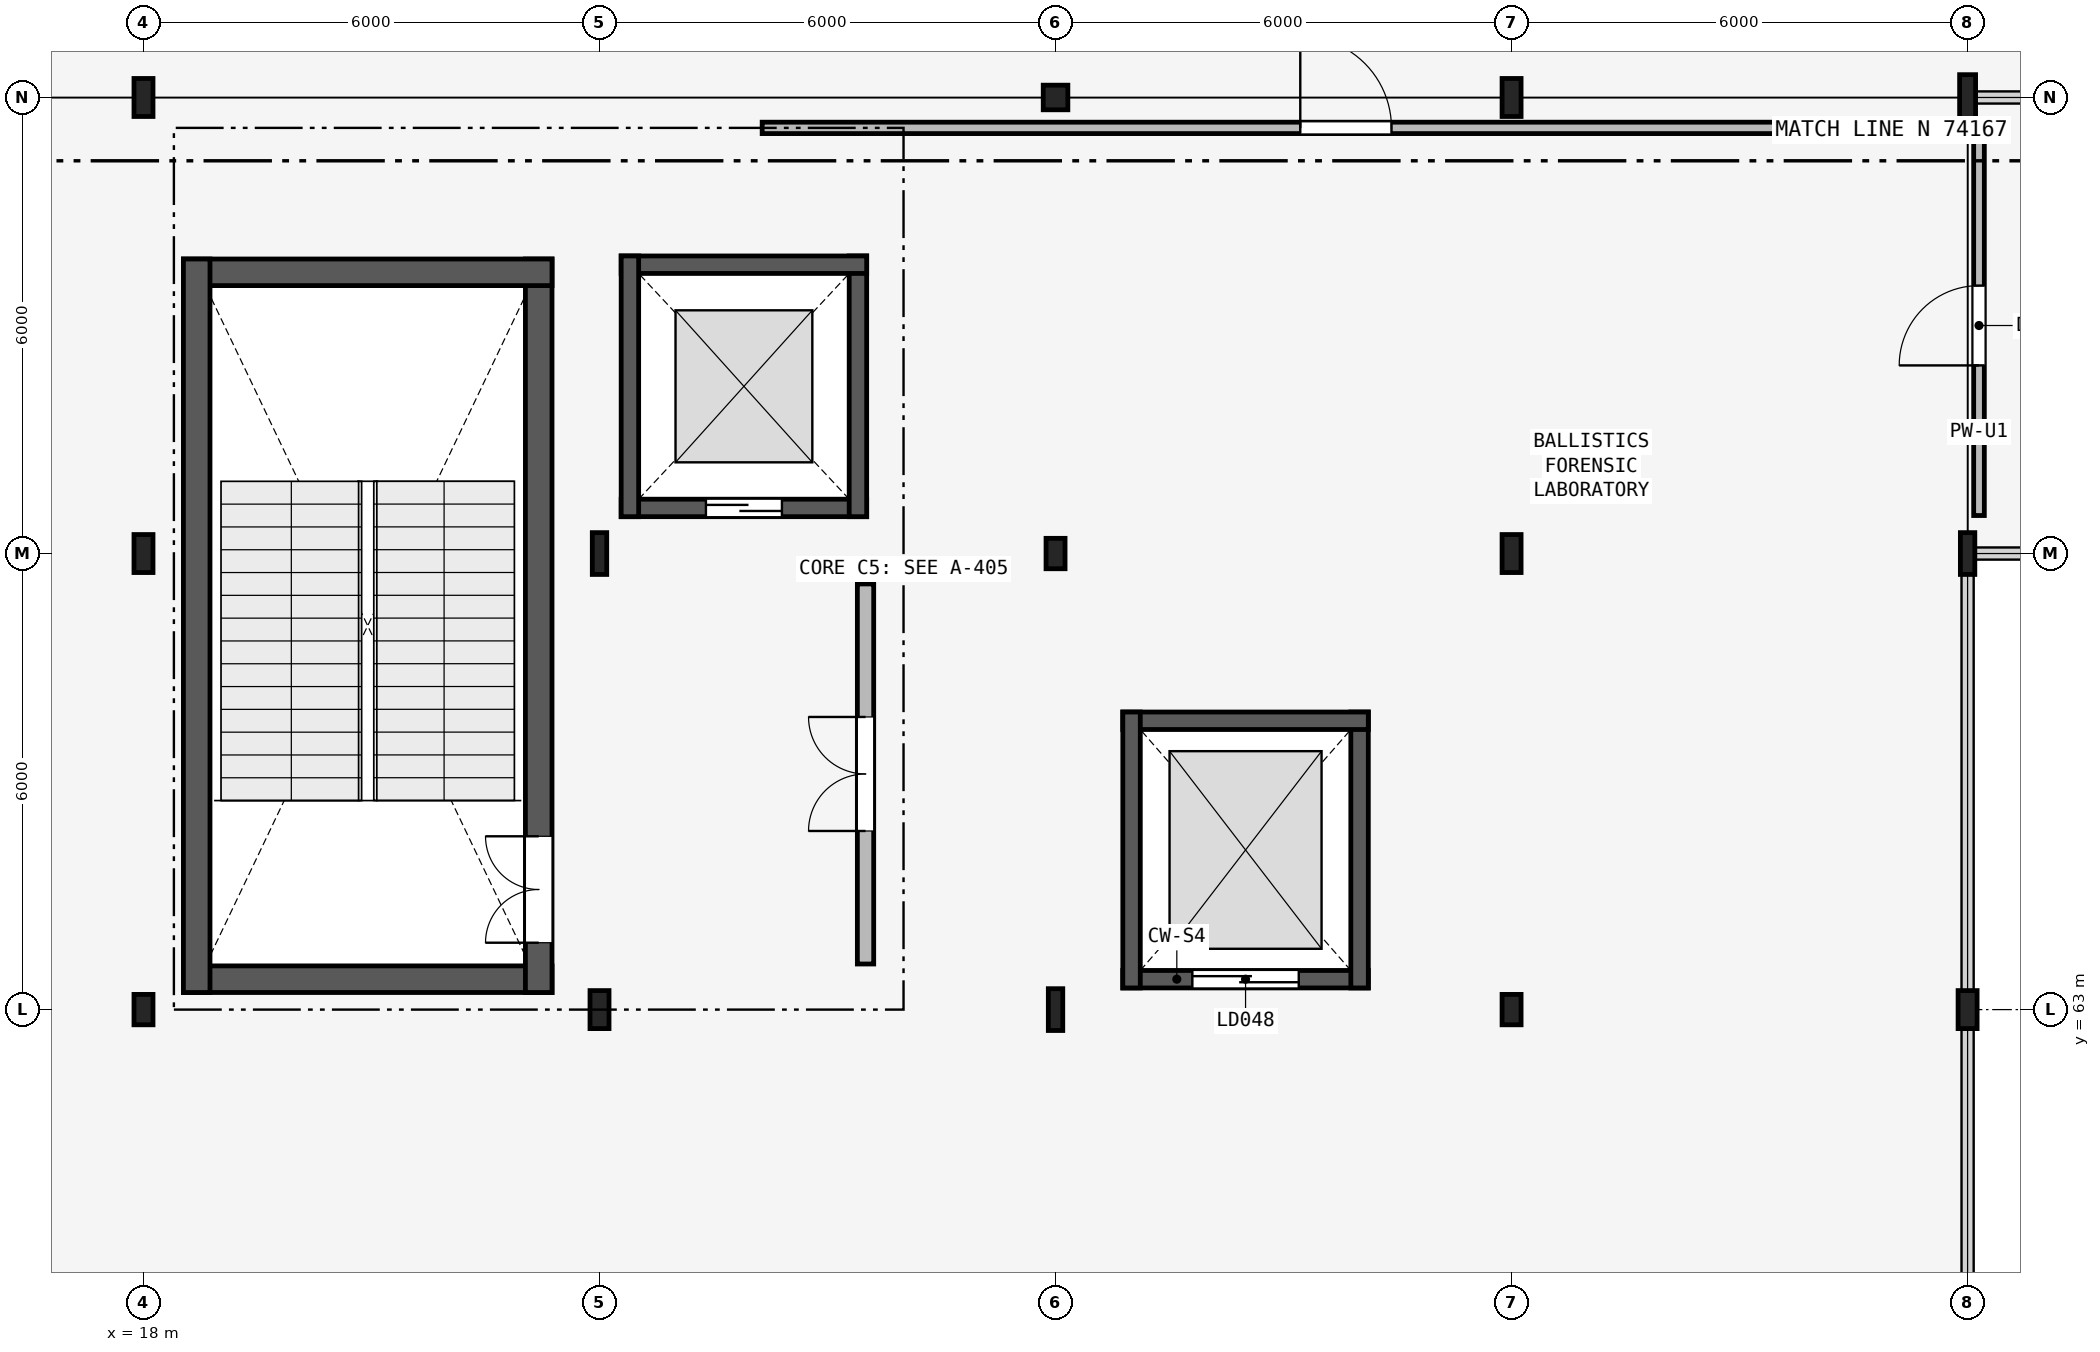
"""IFC4 building model, lengths in metres.
Left out: names, types, materials, properties, quantities, classifications, styles, units other than length and angle.
Written with IfcOpenShell. Run it as: python <this file> out.ifc"""

import sys

from ifc_helpers import new_model, si_unit, direction, frame, frame_2d, origin, origin_2d, place, context, subcontext, project, spatial, rectangle, hollow_circle, i_section, extrude, element, fill, save


model = new_model("IFC4")
c1 = context("Model", 3, precision=1e-05, world=origin(), true_north=direction((0.0, 1.0)))
c2 = subcontext(c1, "Body", "Model", "MODEL_VIEW")
j1 = project(units=[si_unit("LENGTHUNIT", "METRE"), si_unit("PLANEANGLEUNIT", "RADIAN")], contexts=[c1])
p1 = place(None, origin())
s1 = spatial("IfcSite", under=j1, at=p1, CompositionType="ELEMENT")
p2 = place(p1, origin())
s2 = spatial("IfcBuilding", under=s1, at=p2, CompositionType="ELEMENT")
p3 = place(p2, frame((0.0, 0.0, 13.5)))
s3 = spatial("IfcBuildingStorey", under=s2, at=p3, CompositionType="ELEMENT", Elevation=13.5)
p4 = place(p3, frame((18.0, 63.0, 0.0), z_axis=(0.0, 0.0, 1.0), x_axis=(1.0, 0.0, 0.0)))
e1 = element("IfcColumn", 1, at=p4, inside=s3, PredefinedType="COLUMN", context=c2, shape_type="SweptSolid", body=[
    extrude(i_section(OverallWidth=0.25, OverallDepth=0.4, WebThickness=0.01, FlangeThickness=0.013, FilletRadius=0.014, at=origin_2d()), origin(), (0.0, 0.0, 1.0), 4.5),
])
for number, where, z_axis, x_axis in (
    (2, (18.0, 69.0, 0.0), (0.0, 0.0, 1.0), (1.0, 0.0, 0.0)),
    (3, (18.0, 75.0, 0.0), (0.0, 0.0, 1.0), (1.0, 0.0, 0.0)),
    (4, (24.0, 63.0, 0.0), (0.0, 0.0, 1.0), (1.0, 0.0, 0.0)),
):
    element("IfcColumn", number, at=place(p3, frame(where, z_axis=z_axis, x_axis=x_axis)), inside=s3, PredefinedType="COLUMN", context=c2, shape_type="SweptSolid", body=[
        extrude(i_section(OverallWidth=0.25, OverallDepth=0.5, WebThickness=0.01, FlangeThickness=0.015, FilletRadius=0.015, at=origin_2d()), origin(), (0.0, 0.0, 1.0), 4.5),
    ])
for number, where, z_axis, x_axis in (
    (5, (24.0, 69.0, 0.0), (0.0, 0.0, 1.0), (1.0, 0.0, 0.0)),
    (6, (30.0, 63.0, 0.0), (0.0, 0.0, 1.0), (1.0, 0.0, 0.0)),
):
    element("IfcColumn", number, at=place(p3, frame(where, z_axis=z_axis, x_axis=x_axis)), inside=s3, PredefinedType="COLUMN", context=c2, shape_type="SweptSolid", body=[
        extrude(i_section(OverallWidth=0.19, OverallDepth=0.55, WebThickness=0.011, FlangeThickness=0.019, FilletRadius=0.018, at=origin_2d()), origin(), (0.0, 0.0, 1.0), 4.5),
    ])
p5 = place(p3, frame((30.0, 69.0, 0.0), z_axis=(0.0, 0.0, 1.0), x_axis=(1.0, 0.0, 0.0)))
e7 = element("IfcColumn", 7, at=p5, inside=s3, PredefinedType="COLUMN", context=c2, shape_type="SweptSolid", body=[
    extrude(i_section(OverallWidth=0.25, OverallDepth=0.4, WebThickness=0.01, FlangeThickness=0.013, FilletRadius=0.014, at=origin_2d()), origin(), (0.0, 0.0, 1.0), 4.5),
])
p6 = place(p3, frame((30.0, 75.0, 0.0), z_axis=(0.0, 0.0, 1.0), x_axis=(1.0, 0.0, 0.0)))
e8 = element("IfcColumn", 8, at=p6, inside=s3, PredefinedType="COLUMN", context=c2, shape_type="SweptSolid", body=[
    extrude(hollow_circle(Radius=0.162, WallThickness=0.013, at=origin_2d()), origin(), (0.0, 0.0, 1.0), 4.5),
])
p7 = place(p3, frame((36.0, 63.0, 0.0), z_axis=(0.0, 0.0, 1.0), x_axis=(1.0, 0.0, 0.0)))
e9 = element("IfcColumn", 9, at=p7, inside=s3, PredefinedType="COLUMN", context=c2, shape_type="SweptSolid", body=[
    extrude(i_section(OverallWidth=0.25, OverallDepth=0.4, WebThickness=0.01, FlangeThickness=0.013, FilletRadius=0.014, at=origin_2d()), origin(), (0.0, 0.0, 1.0), 4.5),
])
for number, where, z_axis, x_axis in (
    (10, (36.0, 69.0, 0.0), (0.0, 0.0, 1.0), (1.0, 0.0, 0.0)),
    (11, (36.0, 75.0, 0.0), (0.0, 0.0, 1.0), (1.0, 0.0, 0.0)),
    (12, (42.0, 63.0, 0.0), (0.0, 0.0, 1.0), (1.0, 0.0, 0.0)),
):
    element("IfcColumn", number, at=place(p3, frame(where, z_axis=z_axis, x_axis=x_axis)), inside=s3, PredefinedType="COLUMN", context=c2, shape_type="SweptSolid", body=[
        extrude(i_section(OverallWidth=0.25, OverallDepth=0.5, WebThickness=0.01, FlangeThickness=0.015, FilletRadius=0.015, at=origin_2d()), origin(), (0.0, 0.0, 1.0), 4.5),
    ])
p8 = place(p3, frame((42.0, 69.0, 0.0), z_axis=(0.0, 0.0, 1.0), x_axis=(1.0, 0.0, 0.0)))
e13 = element("IfcColumn", 13, at=p8, inside=s3, PredefinedType="COLUMN", context=c2, shape_type="SweptSolid", body=[
    extrude(i_section(OverallWidth=0.19, OverallDepth=0.55, WebThickness=0.011, FlangeThickness=0.019, FilletRadius=0.018, at=origin_2d()), origin(), (0.0, 0.0, 1.0), 4.5),
])
p9 = place(p3, frame((42.0, 75.0, 0.0), z_axis=(0.0, 0.0, 1.0), x_axis=(1.0, 0.0, 0.0)))
e14 = element("IfcColumn", 14, at=p9, inside=s3, PredefinedType="COLUMN", context=c2, shape_type="SweptSolid", body=[
    extrude(i_section(OverallWidth=0.21, OverallDepth=0.6, WebThickness=0.012, FlangeThickness=0.021, FilletRadius=0.02, at=origin_2d()), origin(), (0.0, 0.0, 1.0), 4.5),
])
p10 = place(p3, frame((18.525, 63.4, 0.0), z_axis=(0.0, 0.0, 1.0), x_axis=(1.0, 0.0, 0.0)))
e15 = element("IfcWall", 15, at=p10, inside=s3, PredefinedType="SHEAR", context=c2, shape_type="SweptSolid", body=[
    extrude(rectangle(XDim=4.85, YDim=0.35, at=frame_2d((2.425, 0.0))), origin(), (0.0, 0.0, 1.0), 4.36),
])
p11 = place(p3, frame((23.2, 63.225, 0.0), z_axis=(0.0, 0.0, 1.0), x_axis=(0.0, 1.0, 0.0)))
e16 = element("IfcWall", 16, at=p11, inside=s3, PredefinedType="SHEAR", context=c2, shape_type="SweptSolid", body=[
    extrude(rectangle(XDim=9.65, YDim=0.35, at=frame_2d((4.825, 0.0))), origin(), (0.0, 0.0, 1.0), 4.36),
])
p12 = place(p11, frame((0.655, 0.0, 0.0)))
e17 = element("IfcOpeningElement", 17, at=p12, cuts=e16, PredefinedType="OPENING", context=c2, shape_type="SweptSolid", body=[
    extrude(rectangle(XDim=1.4, YDim=2.2, at=frame_2d((0.7, 1.1))), frame((0.0, 0.185, 0.0), z_axis=(0.0, -1.0, 0.0), x_axis=(1.0, 0.0, 0.0)), (0.0, 0.0, 1.0), 0.37),
])
p13 = place(p3, frame((23.375, 72.7, 0.0), z_axis=(0.0, 0.0, 1.0), x_axis=(-1.0, 0.0, 0.0)))
e18 = element("IfcWall", 18, at=p13, inside=s3, PredefinedType="SHEAR", context=c2, shape_type="SweptSolid", body=[
    extrude(rectangle(XDim=4.85, YDim=0.35, at=frame_2d((2.425, 0.0))), origin(), (0.0, 0.0, 1.0), 4.36),
])
p14 = place(p3, frame((18.7, 72.875, 0.0), z_axis=(0.0, 0.0, 1.0), x_axis=(0.0, -1.0, 0.0)))
e19 = element("IfcWall", 19, at=p14, inside=s3, PredefinedType="SHEAR", context=c2, shape_type="SweptSolid", body=[
    extrude(rectangle(XDim=9.65, YDim=0.35, at=frame_2d((4.825, 0.0))), origin(), (0.0, 0.0, 1.0), 4.36),
])
p15 = place(p3, frame((27.5, 63.6, 0.0), z_axis=(0.0, 0.0, 1.0), x_axis=(0.0, 1.0, 0.0)))
e20 = element("IfcWall", 20, at=p15, inside=s3, PredefinedType="PARTITIONING", context=c2, shape_type="SweptSolid", body=[
    extrude(rectangle(XDim=5.0, YDim=0.215, at=frame_2d((2.5, 0.0))), origin(), (0.0, 0.0, 1.0), 4.19),
])
p16 = place(p15, frame((1.75, 0.0, 0.0)))
e21 = element("IfcOpeningElement", 21, at=p16, cuts=e20, PredefinedType="OPENING", context=c2, shape_type="SweptSolid", body=[
    extrude(rectangle(XDim=1.5, YDim=2.15, at=frame_2d((0.75, 1.075))), frame((0.0, 0.117, 0.0), z_axis=(0.0, -1.0, 0.0), x_axis=(1.0, 0.0, 0.0)), (0.0, 0.0, 1.0), 0.235),
])
p17 = place(p3, frame((24.285, 69.6, 0.0), z_axis=(0.0, 0.0, 1.0), x_axis=(1.0, 0.0, 0.0)))
e22 = element("IfcWall", 22, at=p17, inside=s3, PredefinedType="SHEAR", context=c2, shape_type="SweptSolid", body=[
    extrude(rectangle(XDim=3.23, YDim=0.23, at=frame_2d((1.615, 0.0))), origin(), (0.0, 0.0, 1.0), 4.5),
])
p18 = place(p17, frame((1.115, 0.0, 0.0)))
e23 = element("IfcOpeningElement", 23, at=p18, cuts=e22, PredefinedType="OPENING", context=c2, shape_type="SweptSolid", body=[
    extrude(rectangle(XDim=1.0, YDim=2.15, at=frame_2d((0.5, 1.075))), frame((0.0, 0.125, 0.0), z_axis=(0.0, -1.0, 0.0), x_axis=(1.0, 0.0, 0.0)), (0.0, 0.0, 1.0), 0.25),
])
p19 = place(p3, frame((27.4, 69.485, 0.0), z_axis=(0.0, 0.0, 1.0), x_axis=(0.0, 1.0, 0.0)))
e24 = element("IfcWall", 24, at=p19, inside=s3, PredefinedType="SHEAR", context=c2, shape_type="SweptSolid", body=[
    extrude(rectangle(XDim=3.43, YDim=0.23, at=frame_2d((1.715, 0.0))), origin(), (0.0, 0.0, 1.0), 4.5),
])
p20 = place(p3, frame((27.515, 72.8, 0.0), z_axis=(0.0, 0.0, 1.0), x_axis=(-1.0, 0.0, 0.0)))
e25 = element("IfcWall", 25, at=p20, inside=s3, PredefinedType="SHEAR", context=c2, shape_type="SweptSolid", body=[
    extrude(rectangle(XDim=3.23, YDim=0.23, at=frame_2d((1.615, 0.0))), origin(), (0.0, 0.0, 1.0), 4.5),
])
p21 = place(p3, frame((24.4, 72.915, 0.0), z_axis=(0.0, 0.0, 1.0), x_axis=(0.0, -1.0, 0.0)))
e26 = element("IfcWall", 26, at=p21, inside=s3, PredefinedType="SHEAR", context=c2, shape_type="SweptSolid", body=[
    extrude(rectangle(XDim=3.43, YDim=0.23, at=frame_2d((1.715, 0.0))), origin(), (0.0, 0.0, 1.0), 4.5),
])
p22 = place(p3, frame((30.885, 63.4, 0.0), z_axis=(0.0, 0.0, 1.0), x_axis=(1.0, 0.0, 0.0)))
e27 = element("IfcWall", 27, at=p22, inside=s3, PredefinedType="SHEAR", context=c2, shape_type="SweptSolid", body=[
    extrude(rectangle(XDim=3.23, YDim=0.23, at=frame_2d((1.615, 0.0))), origin(), (0.0, 0.0, 1.0), 4.5),
])
p23 = place(p22, frame((0.915, 0.0, 0.0)))
e28 = element("IfcOpeningElement", 28, at=p23, cuts=e27, PredefinedType="OPENING", context=c2, shape_type="SweptSolid", body=[
    extrude(rectangle(XDim=1.4, YDim=2.3, at=frame_2d((0.7, 1.15))), frame((0.0, 0.125, 0.0), z_axis=(0.0, -1.0, 0.0), x_axis=(1.0, 0.0, 0.0)), (0.0, 0.0, 1.0), 0.25),
])
p24 = place(p3, frame((34.0, 63.285, 0.0), z_axis=(0.0, 0.0, 1.0), x_axis=(0.0, 1.0, 0.0)))
e29 = element("IfcWall", 29, at=p24, inside=s3, PredefinedType="SHEAR", context=c2, shape_type="SweptSolid", body=[
    extrude(rectangle(XDim=3.63, YDim=0.23, at=frame_2d((1.815, 0.0))), origin(), (0.0, 0.0, 1.0), 4.5),
])
p25 = place(p3, frame((34.115, 66.8, 0.0), z_axis=(0.0, 0.0, 1.0), x_axis=(-1.0, 0.0, 0.0)))
e30 = element("IfcWall", 30, at=p25, inside=s3, PredefinedType="SHEAR", context=c2, shape_type="SweptSolid", body=[
    extrude(rectangle(XDim=3.23, YDim=0.23, at=frame_2d((1.615, 0.0))), origin(), (0.0, 0.0, 1.0), 4.5),
])
p26 = place(p3, frame((31.0, 66.915, 0.0), z_axis=(0.0, 0.0, 1.0), x_axis=(0.0, -1.0, 0.0)))
e31 = element("IfcWall", 31, at=p26, inside=s3, PredefinedType="SHEAR", context=c2, shape_type="SweptSolid", body=[
    extrude(rectangle(XDim=3.63, YDim=0.23, at=frame_2d((1.815, 0.0))), origin(), (0.0, 0.0, 1.0), 4.5),
])
p27 = place(p3, frame((42.15, 69.5, 0.0), z_axis=(0.0, 0.0, 1.0), x_axis=(0.0, 1.0, 0.0)))
e32 = element("IfcWall", 32, at=p27, inside=s3, PredefinedType="PARTITIONING", context=c2, shape_type="SweptSolid", body=[
    extrude(rectangle(XDim=5.0, YDim=0.14, at=frame_2d((2.5, 0.0))), origin(), (0.0, 0.0, 1.0), 3.69),
])
p28 = place(p27, frame((1.975, 0.0, 0.0)))
e33 = element("IfcOpeningElement", 33, at=p28, cuts=e32, PredefinedType="OPENING", context=c2, shape_type="SweptSolid", body=[
    extrude(rectangle(XDim=1.05, YDim=2.2, at=frame_2d((0.525, 1.1))), frame((0.0, 0.08, 0.0), z_axis=(0.0, -1.0, 0.0), x_axis=(1.0, 0.0, 0.0)), (0.0, 0.0, 1.0), 0.16),
])
p29 = place(p3, frame((26.14, 74.6, 0.0), z_axis=(0.0, 0.0, 1.0), x_axis=(1.0, 0.0, 0.0)))
e34 = element("IfcWall", 34, at=p29, inside=s3, PredefinedType="PARTITIONING", context=c2, shape_type="SweptSolid", body=[
    extrude(rectangle(XDim=15.36, YDim=0.15, at=frame_2d((7.68, 0.0))), origin(), (0.0, 0.0, 1.0), 3.69),
])
p30 = place(p29, frame((7.08, 0.0, 0.0)))
e35 = element("IfcOpeningElement", 35, at=p30, cuts=e34, PredefinedType="OPENING", context=c2, shape_type="SweptSolid", body=[
    extrude(rectangle(XDim=1.2, YDim=2.15, at=frame_2d((0.6, 1.075))), frame((0.0, 0.085, 0.0), z_axis=(0.0, -1.0, 0.0), x_axis=(1.0, 0.0, 0.0)), (0.0, 0.0, 1.0), 0.17),
])
p31 = place(p12, origin())
e36 = element("IfcDoor", 36, at=p31, inside=s3, OperationType="DOUBLE_DOOR_SINGLE_SWING", PredefinedType="DOOR", context=c2, shape_type="SweptSolid", body=[
    extrude(rectangle(XDim=1.4, YDim=2.2, at=frame_2d((0.7, 1.1))), frame((0.0, 0.025, 0.0), z_axis=(0.0, -1.0, 0.0), x_axis=(1.0, 0.0, 0.0)), (0.0, 0.0, 1.0), 0.05),
])
fill(e17, e36)
p32 = place(p16, origin())
e37 = element("IfcDoor", 37, at=p32, inside=s3, OperationType="DOUBLE_DOOR_SINGLE_SWING", PredefinedType="DOOR", context=c2, shape_type="SweptSolid", body=[
    extrude(rectangle(XDim=1.5, YDim=2.15, at=frame_2d((0.75, 1.075))), frame((0.0, 0.025, 0.0), z_axis=(0.0, -1.0, 0.0), x_axis=(1.0, 0.0, 0.0)), (0.0, 0.0, 1.0), 0.05),
])
fill(e21, e37)
p33 = place(p18, origin())
e38 = element("IfcDoor", 38, at=p33, inside=s3, OperationType="SLIDING_TO_LEFT", PredefinedType="DOOR", context=c2, shape_type="SweptSolid", body=[
    extrude(rectangle(XDim=1.0, YDim=2.15, at=frame_2d((0.5, 1.075))), frame((0.0, 0.025, 0.0), z_axis=(0.0, -1.0, 0.0), x_axis=(1.0, 0.0, 0.0)), (0.0, 0.0, 1.0), 0.05),
])
fill(e23, e38)
p34 = place(p23, origin())
e39 = element("IfcDoor", 39, at=p34, inside=s3, OperationType="SLIDING_TO_LEFT", PredefinedType="DOOR", context=c2, shape_type="SweptSolid", body=[
    extrude(rectangle(XDim=1.4, YDim=2.3, at=frame_2d((0.7, 1.15))), frame((0.0, 0.025, 0.0), z_axis=(0.0, -1.0, 0.0), x_axis=(1.0, 0.0, 0.0)), (0.0, 0.0, 1.0), 0.05),
])
fill(e28, e39)
p35 = place(p28, origin())
e40 = element("IfcDoor", 40, at=p35, inside=s3, OperationType="SINGLE_SWING_LEFT", PredefinedType="DOOR", context=c2, shape_type="SweptSolid", body=[
    extrude(rectangle(XDim=1.05, YDim=2.2, at=frame_2d((0.525, 1.1))), frame((0.0, 0.025, 0.0), z_axis=(0.0, -1.0, 0.0), x_axis=(1.0, 0.0, 0.0)), (0.0, 0.0, 1.0), 0.05),
])
fill(e33, e40)
p36 = place(p30, origin())
e41 = element("IfcDoor", 41, at=p36, inside=s3, OperationType="SINGLE_SWING_LEFT", PredefinedType="DOOR", context=c2, shape_type="SweptSolid", body=[
    extrude(rectangle(XDim=1.2, YDim=2.15, at=frame_2d((0.6, 1.075))), frame((0.0, 0.025, 0.0), z_axis=(0.0, -1.0, 0.0), x_axis=(1.0, 0.0, 0.0)), (0.0, 0.0, 1.0), 0.05),
])
fill(e35, e41)
save(model, sys.argv[1])
